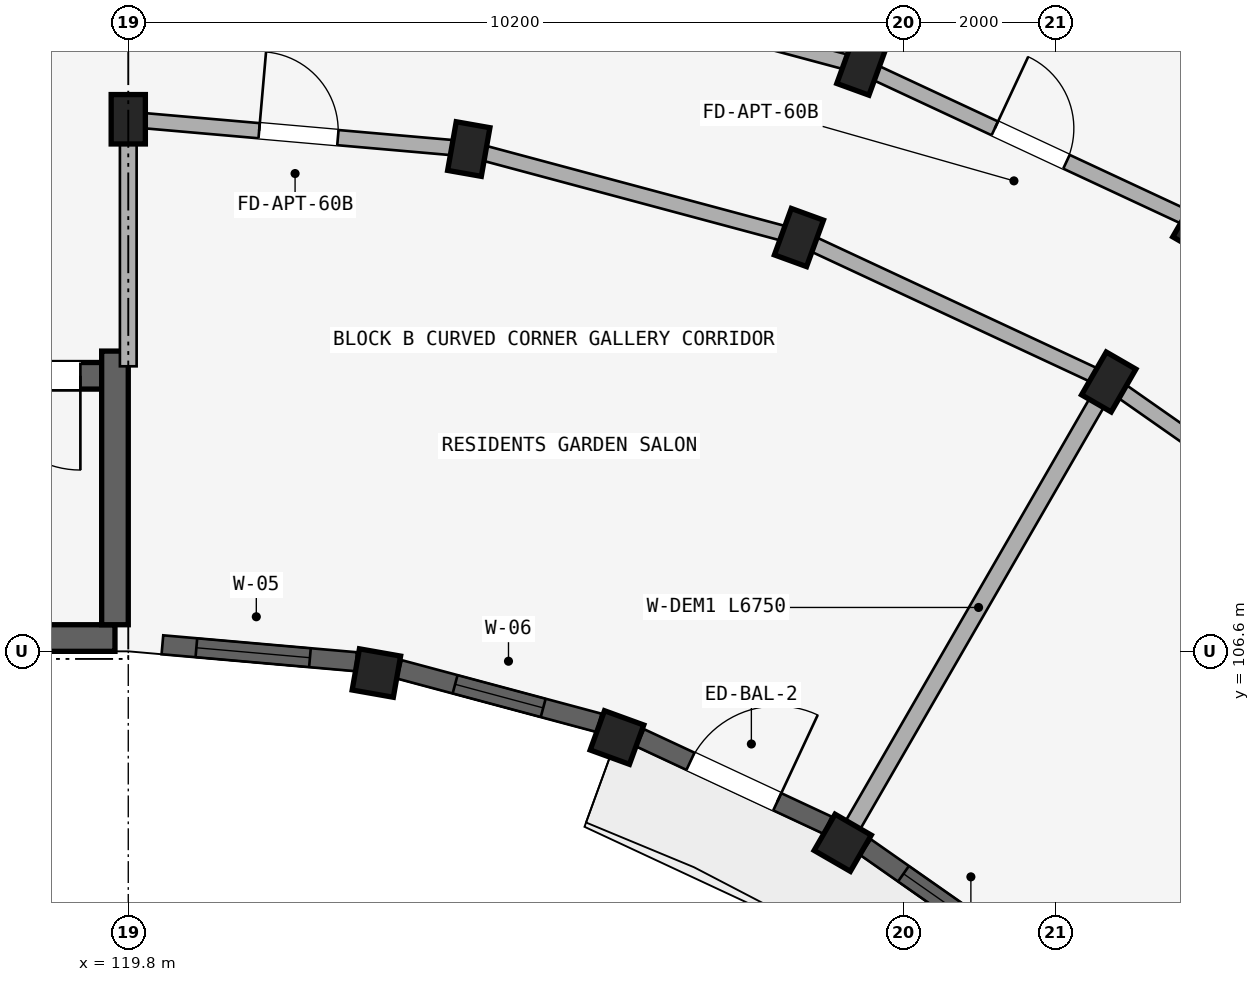
"""IFC4 building model, lengths in metres.
Left out: names, types, materials, properties, quantities, classifications, styles, units other than length and angle.
Written with IfcOpenShell. Run it as: python <this file> out.ifc"""

import sys

from ifc_helpers import new_model, si_unit, direction, frame, frame_2d, origin, origin_2d, place, context, subcontext, project, spatial, rectangle, extrude, element, fill, save


model = new_model("IFC4")
c1 = context("Model", 3, precision=1e-05, world=origin(), true_north=direction((0.0, 1.0)))
c2 = subcontext(c1, "Body", "Model", "MODEL_VIEW")
j1 = project(units=[si_unit("LENGTHUNIT", "METRE"), si_unit("PLANEANGLEUNIT", "RADIAN")], contexts=[c1])
p1 = place(None, origin())
s1 = spatial("IfcSite", under=j1, at=p1, CompositionType="ELEMENT")
p2 = place(p1, origin())
s2 = spatial("IfcBuilding", under=s1, at=p2, CompositionType="ELEMENT")
p3 = place(p2, frame((0.0, 0.0, 33.9)))
s3 = spatial("IfcBuildingStorey", under=s2, at=p3, CompositionType="ELEMENT", Elevation=33.9)
p4 = place(p3, frame((119.625, 106.775, 0.0), z_axis=(0.0, 0.0, 1.0), x_axis=(-1.0, 0.0, 0.0)))
e1 = element("IfcWall", 1, at=p4, inside=s3, PredefinedType="SHEAR", context=c2, shape_type="SweptSolid", body=[
    extrude(rectangle(XDim=8.25, YDim=0.35, at=frame_2d((4.125, 0.0))), origin(), (0.0, 0.0, 1.0), 2.93),
])
p5 = place(p3, frame((119.45, 110.225, 0.0), z_axis=(0.0, 0.0, 1.0), x_axis=(-1.0, 0.0, 0.0)))
e2 = element("IfcWall", 2, at=p5, inside=s3, PredefinedType="SHEAR", context=c2, shape_type="SweptSolid", body=[
    extrude(rectangle(XDim=7.9, YDim=0.35, at=frame_2d((3.95, 0.0))), origin(), (0.0, 0.0, 1.0), 2.93),
])
p6 = place(p5, frame((0.28, 0.0, 0.0)))
e3 = element("IfcOpeningElement", 3, at=p6, cuts=e2, PredefinedType="OPENING", context=c2, shape_type="SweptSolid", body=[
    extrude(rectangle(XDim=1.24, YDim=2.15, at=frame_2d((0.62, 1.075))), frame((0.0, 0.185, 0.0), z_axis=(0.0, -1.0, 0.0), x_axis=(1.0, 0.0, 0.0)), (0.0, 0.0, 1.0), 0.37),
])
p7 = place(p3, frame((119.625, 106.95, 0.0), z_axis=(0.0, 0.0, 1.0), x_axis=(0.0, 1.0, 0.0)))
e4 = element("IfcWall", 4, at=p7, inside=s3, PredefinedType="SHEAR", context=c2, shape_type="SweptSolid", body=[
    extrude(rectangle(XDim=3.6, YDim=0.35, at=frame_2d((1.8, 0.0))), origin(), (0.0, 0.0, 1.0), 2.93),
])
p8 = place(p3, frame((119.8, 113.6, 0.0), z_axis=(0.0, 0.0, 1.0), x_axis=(1.0, 0.0, 0.0)))
e5 = element("IfcColumn", 5, at=p8, inside=s3, PredefinedType="COLUMN", context=c2, shape_type="SweptSolid", body=[
    extrude(rectangle(XDim=0.45, YDim=0.65, at=origin_2d()), origin(), (0.0, 0.0, 1.0), 2.93),
])
p9 = place(p3, frame((123.065, 106.314, 0.0), z_axis=(0.0, 0.0, 1.0), x_axis=(-0.984807753012, 0.173648177667, 0.0)))
e6 = element("IfcColumn", 6, at=p9, inside=s3, PredefinedType="COLUMN", context=c2, shape_type="SweptSolid", body=[
    extrude(rectangle(XDim=0.55, YDim=0.55, at=origin_2d()), origin(), (0.0, 0.0, 1.0), 2.93),
])
p10 = place(p3, frame((124.28, 113.208, 0.0), z_axis=(0.0, 0.0, 1.0), x_axis=(-0.984807753012, 0.173648177667, 0.0)))
e7 = element("IfcColumn", 7, at=p10, inside=s3, PredefinedType="COLUMN", context=c2, shape_type="SweptSolid", body=[
    extrude(rectangle(XDim=0.45, YDim=0.65, at=origin_2d()), origin(), (0.0, 0.0, 1.0), 2.93),
])
p11 = place(p3, frame((126.23, 105.466, 0.0), z_axis=(0.0, 0.0, 1.0), x_axis=(-0.939692620786, 0.342020143326, 0.0)))
e8 = element("IfcColumn", 8, at=p11, inside=s3, PredefinedType="COLUMN", context=c2, shape_type="SweptSolid", body=[
    extrude(rectangle(XDim=0.55, YDim=0.55, at=origin_2d()), origin(), (0.0, 0.0, 1.0), 2.93),
])
for number, where, z_axis, x_axis in (
    (9, (128.624, 112.044, 0.0), (0.0, 0.0, 1.0), (-0.94, 0.342, 0.0)),
    (10, (129.445, 114.299, 0.0), (0.0, 0.0, 1.0), (-0.94, 0.342, 0.0)),
):
    element("IfcColumn", number, at=place(p3, frame(where, z_axis=z_axis, x_axis=x_axis)), inside=s3, PredefinedType="COLUMN", context=c2, shape_type="SweptSolid", body=[
        extrude(rectangle(XDim=0.45, YDim=0.65, at=origin_2d()), origin(), (0.0, 0.0, 1.0), 2.93),
    ])
p12 = place(p3, frame((129.2, 104.081, 0.0), z_axis=(0.0, 0.0, 1.0), x_axis=(-0.866025403784, 0.5, 0.0)))
e11 = element("IfcColumn", 11, at=p12, inside=s3, PredefinedType="COLUMN", context=c2, shape_type="SweptSolid", body=[
    extrude(rectangle(XDim=0.55, YDim=0.55, at=origin_2d()), origin(), (0.0, 0.0, 1.0), 2.93),
])
for number, where, z_axis, x_axis in (
    (12, (132.7, 110.144, 0.0), (0.0, 0.0, 1.0), (-0.866, 0.5, 0.0)),
    (13, (133.9, 112.222, 0.0), (0.0, 0.0, 1.0), (-0.866, 0.5, 0.0)),
):
    element("IfcColumn", number, at=place(p3, frame(where, z_axis=z_axis, x_axis=x_axis)), inside=s3, PredefinedType="COLUMN", context=c2, shape_type="SweptSolid", body=[
        extrude(rectangle(XDim=0.45, YDim=0.65, at=origin_2d()), origin(), (0.0, 0.0, 1.0), 2.93),
    ])
p13 = place(p3, frame((119.8, 113.6, 0.0), z_axis=(0.0, 0.0, 1.0), x_axis=(0.996191949488, -0.087187153726, 0.0)))
e14 = element("IfcWall", 14, at=p13, inside=s3, PredefinedType="STANDARD", context=c2, shape_type="SweptSolid", body=[
    extrude(rectangle(XDim=4.497, YDim=0.2, at=frame_2d((2.249, 0.0))), origin(), (0.0, 0.0, 1.0), 2.372),
])
p14 = place(p13, frame((1.729, 0.0, 0.0)))
e15 = element("IfcOpeningElement", 15, at=p14, cuts=e14, PredefinedType="OPENING", context=c2, shape_type="SweptSolid", body=[
    extrude(rectangle(XDim=1.04, YDim=2.15, at=frame_2d((0.52, 1.075))), frame((0.0, 0.11, 0.0), z_axis=(0.0, -1.0, 0.0), x_axis=(1.0, 0.0, 0.0)), (0.0, 0.0, 1.0), 0.22),
])
p15 = place(p3, frame((124.28, 113.208, 0.0), z_axis=(0.0, 0.0, 1.0), x_axis=(0.965934240054, -0.258787642463, 0.0)))
e16 = element("IfcWall", 16, at=p15, inside=s3, PredefinedType="STANDARD", context=c2, shape_type="SweptSolid", body=[
    extrude(rectangle(XDim=4.497, YDim=0.2, at=frame_2d((2.249, 0.0))), origin(), (0.0, 0.0, 1.0), 2.372),
])
p16 = place(p3, frame((124.697, 115.572, 0.0), z_axis=(0.0, 0.0, 1.0), x_axis=(0.965930095386, -0.258803112091, 0.0)))
e17 = element("IfcWall", 17, at=p16, inside=s3, PredefinedType="STANDARD", context=c2, shape_type="SweptSolid", body=[
    extrude(rectangle(XDim=4.916, YDim=0.2, at=frame_2d((2.458, 0.0))), origin(), (0.0, 0.0, 1.0), 2.372),
])
p17 = place(p3, frame((128.624, 112.044, 0.0), z_axis=(0.0, 0.0, 1.0), x_axis=(0.906307919131, -0.422617978463, 0.0)))
e18 = element("IfcWall", 18, at=p17, inside=s3, PredefinedType="STANDARD", context=c2, shape_type="SweptSolid", body=[
    extrude(rectangle(XDim=4.497, YDim=0.2, at=frame_2d((2.249, 0.0))), origin(), (0.0, 0.0, 1.0), 2.372),
])
p18 = place(p3, frame((129.445, 114.299, 0.0), z_axis=(0.0, 0.0, 1.0), x_axis=(0.906302381024, -0.422629854778, 0.0)))
e19 = element("IfcWall", 19, at=p18, inside=s3, PredefinedType="STANDARD", context=c2, shape_type="SweptSolid", body=[
    extrude(rectangle(XDim=4.915, YDim=0.2, at=frame_2d((2.458, 0.0))), origin(), (0.0, 0.0, 1.0), 2.372),
])
p19 = place(p18, frame((1.938, 0.0, 0.0)))
e20 = element("IfcOpeningElement", 20, at=p19, cuts=e19, PredefinedType="OPENING", context=c2, shape_type="SweptSolid", body=[
    extrude(rectangle(XDim=1.04, YDim=2.15, at=frame_2d((0.52, 1.075))), frame((0.0, 0.11, 0.0), z_axis=(0.0, -1.0, 0.0), x_axis=(1.0, 0.0, 0.0)), (0.0, 0.0, 1.0), 0.22),
])
p20 = place(p3, frame((132.7, 110.144, 0.0), z_axis=(0.0, 0.0, 1.0), x_axis=(0.819155404658, -0.573571637217, 0.0)))
e21 = element("IfcWall", 21, at=p20, inside=s3, PredefinedType="STANDARD", context=c2, shape_type="SweptSolid", body=[
    extrude(rectangle(XDim=4.497, YDim=0.2, at=frame_2d((2.249, 0.0))), origin(), (0.0, 0.0, 1.0), 2.372),
])
p21 = place(p20, frame((1.709, 0.0, 0.0)))
e22 = element("IfcOpeningElement", 22, at=p21, cuts=e21, PredefinedType="OPENING", context=c2, shape_type="SweptSolid", body=[
    extrude(rectangle(XDim=1.08, YDim=2.15, at=frame_2d((0.54, 1.075))), frame((0.0, 0.11, 0.0), z_axis=(0.0, -1.0, 0.0), x_axis=(1.0, 0.0, 0.0)), (0.0, 0.0, 1.0), 0.22),
])
p22 = place(p3, frame((119.8, 110.35, 0.0), z_axis=(0.0, 0.0, 1.0), x_axis=(0.0, 1.0, 0.0)))
e23 = element("IfcWall", 23, at=p22, inside=s3, PredefinedType="STANDARD", context=c2, shape_type="SweptSolid", body=[
    extrude(rectangle(XDim=3.2, YDim=0.22, at=frame_2d((1.6, 0.0))), origin(), (0.0, 0.0, 1.0), 2.372),
])
p23 = place(p3, frame((129.479, 114.393, 0.0), z_axis=(0.0, 0.0, 1.0), x_axis=(0.342005081534, 0.939698102693, 0.0)))
e24 = element("IfcWall", 24, at=p23, inside=s3, PredefinedType="STANDARD", context=c2, shape_type="SweptSolid", body=[
    extrude(rectangle(XDim=11.82, YDim=0.22, at=frame_2d((5.91, 0.0))), origin(), (0.0, 0.0, 1.0), 2.372),
])
p24 = place(p3, frame((129.3, 104.254, 0.0), z_axis=(0.0, 0.0, 1.0), x_axis=(0.499997969693, 0.866026575979, 0.0)))
e25 = element("IfcWall", 25, at=p24, inside=s3, PredefinedType="STANDARD", context=c2, shape_type="SweptSolid", body=[
    extrude(rectangle(XDim=6.75, YDim=0.22, at=frame_2d((3.375, 0.0))), origin(), (0.0, 0.0, 1.0), 2.372),
])
p25 = place(p3, frame((120.249, 106.686, 0.0), z_axis=(0.0, 0.0, 1.0), x_axis=(0.996188847542, -0.087222589008, 0.0)))
e26 = element("IfcWall", 26, at=p25, inside=s3, PredefinedType="STANDARD", context=c2, shape_type="SweptSolid", body=[
    extrude(rectangle(XDim=2.558, YDim=0.25, at=frame_2d((1.279, 0.0))), origin(), (0.0, 0.0, 1.0), 2.472),
])
p26 = place(p25, frame((0.448, 0.0, 0.622)))
e27 = element("IfcOpeningElement", 27, at=p26, cuts=e26, PredefinedType="OPENING", context=c2, shape_type="SweptSolid", body=[
    extrude(rectangle(XDim=1.5, YDim=1.65, at=frame_2d((0.75, 0.825))), frame((0.0, 0.135, 0.0), z_axis=(0.0, -1.0, 0.0), x_axis=(1.0, 0.0, 0.0)), (0.0, 0.0, 1.0), 0.27),
])
p27 = place(p3, frame((123.366, 106.363, 0.0), z_axis=(0.0, 0.0, 1.0), x_axis=(0.965928818058, -0.258807879411, 0.0)))
e28 = element("IfcWall", 28, at=p27, inside=s3, PredefinedType="STANDARD", context=c2, shape_type="SweptSolid", body=[
    extrude(rectangle(XDim=2.72, YDim=0.25, at=frame_2d((1.36, 0.0))), origin(), (0.0, 0.0, 1.0), 2.472),
])
p28 = place(p27, frame((0.76, 0.0, 0.772)))
e29 = element("IfcOpeningElement", 29, at=p28, cuts=e28, PredefinedType="OPENING", context=c2, shape_type="SweptSolid", body=[
    extrude(rectangle(XDim=1.2, YDim=1.5, at=frame_2d((0.6, 0.75))), frame((0.0, 0.135, 0.0), z_axis=(0.0, -1.0, 0.0), x_axis=(1.0, 0.0, 0.0)), (0.0, 0.0, 1.0), 0.27),
])
p29 = place(p3, frame((126.535, 105.462, 0.0), z_axis=(0.0, 0.0, 1.0), x_axis=(0.906302358412, -0.422629903269, 0.0)))
e30 = element("IfcWall", 30, at=p29, inside=s3, PredefinedType="STANDARD", context=c2, shape_type="SweptSolid", body=[
    extrude(rectangle(XDim=2.72, YDim=0.25, at=frame_2d((1.36, 0.0))), origin(), (0.0, 0.0, 1.0), 2.472),
])
p30 = place(p29, frame((0.73, 0.0, 0.0)))
e31 = element("IfcOpeningElement", 31, at=p30, cuts=e30, PredefinedType="OPENING", context=c2, shape_type="SweptSolid", body=[
    extrude(rectangle(XDim=1.26, YDim=2.15, at=frame_2d((0.63, 1.075))), frame((0.0, 0.135, 0.0), z_axis=(0.0, -1.0, 0.0), x_axis=(1.0, 0.0, 0.0)), (0.0, 0.0, 1.0), 0.27),
])
p31 = place(p3, frame((129.5, 104.024, 0.0), z_axis=(0.0, 0.0, 1.0), x_axis=(0.819126475299, -0.573612950921, 0.0)))
e32 = element("IfcWall", 32, at=p31, inside=s3, PredefinedType="STANDARD", context=c2, shape_type="SweptSolid", body=[
    extrude(rectangle(XDim=2.72, YDim=0.25, at=frame_2d((1.36, 0.0))), origin(), (0.0, 0.0, 1.0), 2.472),
])
p32 = place(p31, frame((0.61, 0.0, 0.622)))
e33 = element("IfcOpeningElement", 33, at=p32, cuts=e32, PredefinedType="OPENING", context=c2, shape_type="SweptSolid", body=[
    extrude(rectangle(XDim=1.5, YDim=1.65, at=frame_2d((0.75, 0.825))), frame((0.0, 0.135, 0.0), z_axis=(0.0, -1.0, 0.0), x_axis=(1.0, 0.0, 0.0)), (0.0, 0.0, 1.0), 0.27),
])
p33 = place(p26, origin())
e34 = element("IfcWindow", 34, at=p33, inside=s3, PartitioningType="DOUBLE_PANEL_VERTICAL", PredefinedType="WINDOW", context=c2, shape_type="SweptSolid", body=[
    extrude(rectangle(XDim=1.5, YDim=1.65, at=frame_2d((0.75, 0.825))), frame((0.0, 0.03, 0.0), z_axis=(0.0, -1.0, 0.0), x_axis=(1.0, 0.0, 0.0)), (0.0, 0.0, 1.0), 0.06),
])
fill(e27, e34)
p34 = place(p28, origin())
e35 = element("IfcWindow", 35, at=p34, inside=s3, PartitioningType="SINGLE_PANEL", PredefinedType="WINDOW", context=c2, shape_type="SweptSolid", body=[
    extrude(rectangle(XDim=1.2, YDim=1.5, at=frame_2d((0.6, 0.75))), frame((0.0, 0.03, 0.0), z_axis=(0.0, -1.0, 0.0), x_axis=(1.0, 0.0, 0.0)), (0.0, 0.0, 1.0), 0.06),
])
fill(e29, e35)
p35 = place(p32, origin())
e36 = element("IfcWindow", 36, at=p35, inside=s3, PartitioningType="DOUBLE_PANEL_VERTICAL", PredefinedType="WINDOW", context=c2, shape_type="SweptSolid", body=[
    extrude(rectangle(XDim=1.5, YDim=1.65, at=frame_2d((0.75, 0.825))), frame((0.0, 0.03, 0.0), z_axis=(0.0, -1.0, 0.0), x_axis=(1.0, 0.0, 0.0)), (0.0, 0.0, 1.0), 0.06),
])
fill(e33, e36)
p36 = place(p6, origin())
e37 = element("IfcDoor", 37, at=p36, inside=s3, OperationType="SINGLE_SWING_LEFT", PredefinedType="DOOR", context=c2, shape_type="SweptSolid", body=[
    extrude(rectangle(XDim=1.24, YDim=2.15, at=frame_2d((0.62, 1.075))), frame((0.0, 0.025, 0.0), z_axis=(0.0, -1.0, 0.0), x_axis=(1.0, 0.0, 0.0)), (0.0, 0.0, 1.0), 0.05),
])
fill(e3, e37)
p37 = place(p19, origin())
e38 = element("IfcDoor", 38, at=p37, inside=s3, OperationType="SINGLE_SWING_LEFT", PredefinedType="DOOR", context=c2, shape_type="SweptSolid", body=[
    extrude(rectangle(XDim=1.04, YDim=2.15, at=frame_2d((0.52, 1.075))), frame((0.0, 0.025, 0.0), z_axis=(0.0, -1.0, 0.0), x_axis=(1.0, 0.0, 0.0)), (0.0, 0.0, 1.0), 0.05),
])
fill(e20, e38)
p38 = place(p14, origin())
e39 = element("IfcDoor", 39, at=p38, inside=s3, OperationType="SINGLE_SWING_LEFT", PredefinedType="DOOR", context=c2, shape_type="SweptSolid", body=[
    extrude(rectangle(XDim=1.04, YDim=2.15, at=frame_2d((0.52, 1.075))), frame((0.0, 0.025, 0.0), z_axis=(0.0, -1.0, 0.0), x_axis=(1.0, 0.0, 0.0)), (0.0, 0.0, 1.0), 0.05),
])
fill(e15, e39)
p39 = place(p30, frame((1.26, 0.0, 0.0), z_axis=(0.0, 0.0, 1.0), x_axis=(-1.0, 0.0, 0.0)))
e40 = element("IfcDoor", 40, at=p39, inside=s3, OperationType="SINGLE_SWING_LEFT", PredefinedType="DOOR", context=c2, shape_type="SweptSolid", body=[
    extrude(rectangle(XDim=1.26, YDim=2.15, at=frame_2d((0.63, 1.075))), frame((0.0, 0.025, 0.0), z_axis=(0.0, -1.0, 0.0), x_axis=(1.0, 0.0, 0.0)), (0.0, 0.0, 1.0), 0.05),
])
fill(e31, e40)
save(model, sys.argv[1])
